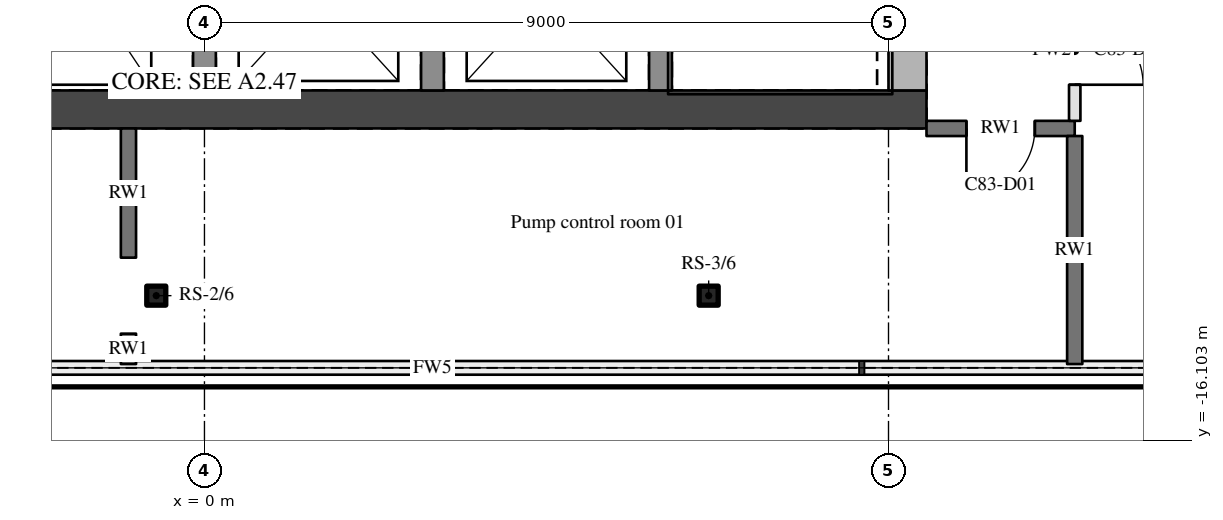
"""IFC4 building model, lengths in metres.
Left out: names, types, materials, properties, quantities, classifications, styles, units other than length and angle.
Written with IfcOpenShell. Run it as: python <this file> out.ifc"""

import sys

from ifc_helpers import new_model, si_unit, direction, frame, frame_2d, origin, origin_2d, place, context, subcontext, project, spatial, polyline, rectangle, hollow_rectangle, outline, extrude, element, fill, save


model = new_model("IFC4")
c1 = context("Model", 3, precision=1e-05, world=origin(), true_north=direction((0.0, 1.0)))
c2 = subcontext(c1, "Body", "Model", "MODEL_VIEW")
j1 = project(units=[si_unit("LENGTHUNIT", "METRE"), si_unit("PLANEANGLEUNIT", "RADIAN")], contexts=[c1])
p1 = place(None, origin())
s1 = spatial("IfcSite", under=j1, at=p1, CompositionType="ELEMENT")
p2 = place(p1, origin())
s2 = spatial("IfcBuilding", under=s1, at=p2, CompositionType="ELEMENT")
p3 = place(p2, frame((0.0, 0.0, 308.1)))
s3 = spatial("IfcBuildingStorey", under=s2, at=p3, CompositionType="ELEMENT", Elevation=308.1)
for number, where, z_axis, x_axis in (
    (1, (-0.634, -14.2, 0.0), (0.0, 0.0, 1.0), (1.0, 0.0, 0.0)),
    (2, (6.634, -14.2, 0.0), (0.0, 0.0, 1.0), (1.0, 0.0, 0.0)),
):
    element("IfcColumn", number, at=place(p3, frame(where, z_axis=z_axis, x_axis=x_axis)), inside=s3, PredefinedType="COLUMN", context=c2, shape_type="SweptSolid", body=[
        extrude(hollow_rectangle(XDim=0.25, YDim=0.25, WallThickness=0.02, InnerFilletRadius=0.03, OuterFilletRadius=0.05, at=origin_2d()), origin(), (0.0, 0.0, 1.0), 3.6),
    ])
p4 = place(p3, frame((-9.5, -11.75, 0.0), z_axis=(0.0, 0.0, 1.0), x_axis=(1.0, 0.0, 0.0)))
e3 = element("IfcWall", 3, at=p4, inside=s3, PredefinedType="SHEAR", context=c2, shape_type="SweptSolid", body=[
    extrude(outline(polyline([(0.0, 0.0), (19.0, 0.0), (19.0, 3.6), (0.0, 3.6), (0.0, 0.0)])), frame((0.0, 0.25, 0.0), z_axis=(0.0, -1.0, 0.0), x_axis=(1.0, 0.0, 0.0)), (0.0, 0.0, 1.0), 0.5),
])
p5 = place(p3, frame((9.25, -11.5, 0.0), z_axis=(0.0, 0.0, 1.0), x_axis=(0.0, 1.0, 0.0)))
e4 = element("IfcWall", 4, at=p5, inside=s3, PredefinedType="SHEAR", context=c2, shape_type="SweptSolid", body=[
    extrude(outline(polyline([(0.0, 0.0), (11.65, 0.0), (11.65, 3.6), (0.0, 3.6), (0.0, 0.0)])), frame((0.0, 0.25, 0.0), z_axis=(0.0, -1.0, 0.0), x_axis=(1.0, 0.0, 0.0)), (0.0, 0.0, 1.0), 0.5),
])
p6 = place(p5, frame((9.4, 0.0, 0.0)))
e5 = element("IfcOpeningElement", 5, at=p6, cuts=e4, PredefinedType="OPENING", context=c2, shape_type="SweptSolid", body=[
    extrude(rectangle(XDim=1.8, YDim=2.1, at=frame_2d((0.9, 1.05))), frame((0.0, 0.26, 0.0), z_axis=(0.0, -1.0, 0.0), x_axis=(1.0, 0.0, 0.0)), (0.0, 0.0, 1.0), 0.52),
])
p7 = place(p5, frame((5.25, 0.0, 0.0)))
e6 = element("IfcOpeningElement", 6, at=p7, cuts=e4, PredefinedType="OPENING", context=c2, shape_type="SweptSolid", body=[
    extrude(rectangle(XDim=1.1, YDim=2.1, at=frame_2d((0.55, 1.05))), frame((0.0, 0.26, 0.0), z_axis=(0.0, -1.0, 0.0), x_axis=(1.0, 0.0, 0.0)), (0.0, 0.0, 1.0), 0.52),
])
p8 = place(p3, frame((11.45, -12.0, 0.0), z_axis=(0.0, 0.0, 1.0), x_axis=(-1.0, 0.0, 0.0)))
e7 = element("IfcWall", 7, at=p8, inside=s3, PredefinedType="SOLIDWALL", context=c2, shape_type="SweptSolid", body=[
    extrude(rectangle(XDim=1.95, YDim=0.2, at=frame_2d((0.975, 0.0))), origin(), (0.0, 0.0, 1.0), 2.66),
])
p9 = place(p8, frame((0.525, 0.0, 0.0)))
e8 = element("IfcOpeningElement", 8, at=p9, cuts=e7, PredefinedType="OPENING", context=c2, shape_type="SweptSolid", body=[
    extrude(rectangle(XDim=0.9, YDim=2.1, at=frame_2d((0.45, 1.05))), frame((0.0, 0.11, 0.0), z_axis=(0.0, -1.0, 0.0), x_axis=(1.0, 0.0, 0.0)), (0.0, 0.0, 1.0), 0.22),
])
p10 = place(p3, frame((-1.0, -15.1, 0.0), z_axis=(0.0, 0.0, 1.0), x_axis=(0.0, 1.0, 0.0)))
e9 = element("IfcWall", 9, at=p10, inside=s3, PredefinedType="SOLIDWALL", context=c2, shape_type="SweptSolid", body=[
    extrude(rectangle(XDim=0.4, YDim=0.2, at=frame_2d((0.2, 0.0))), origin(), (0.0, 0.0, 1.0), 2.66),
])
p11 = place(p3, frame((-1.0, -13.7, 0.0), z_axis=(0.0, 0.0, 1.0), x_axis=(0.0, 1.0, 0.0)))
e10 = element("IfcWall", 10, at=p11, inside=s3, PredefinedType="SOLIDWALL", context=c2, shape_type="SweptSolid", body=[
    extrude(rectangle(XDim=1.7, YDim=0.2, at=frame_2d((0.85, 0.0))), origin(), (0.0, 0.0, 1.0), 2.66),
])
for number, where, z_axis, x_axis in (
    (11, (0.0, -11.5, 0.0), (0.0, 0.0, 1.0), (0.0, 1.0, 0.0)),
    (12, (3.0, -11.5, 0.0), (0.0, 0.0, 1.0), (0.0, 1.0, 0.0)),
):
    element("IfcWall", number, at=place(p3, frame(where, z_axis=z_axis, x_axis=x_axis)), inside=s3, PredefinedType="SHEAR", context=c2, shape_type="SweptSolid", body=[
        extrude(rectangle(XDim=2.4, YDim=0.3, at=frame_2d((1.2, 0.0))), origin(), (0.0, 0.0, 1.0), 3.6),
    ])
p12 = place(p3, frame((6.0, -5.1, 0.0), z_axis=(0.0, 0.0, 1.0), x_axis=(0.0, -1.0, 0.0)))
e13 = element("IfcWall", 13, at=p12, inside=s3, PredefinedType="SHEAR", context=c2, shape_type="SweptSolid", body=[
    extrude(rectangle(XDim=6.4, YDim=0.3, at=frame_2d((3.2, 0.0))), origin(), (0.0, 0.0, 1.0), 3.6),
])
p13 = place(p12, frame((0.15, 0.0, 0.0)))
e14 = element("IfcOpeningElement", 14, at=p13, cuts=e13, PredefinedType="OPENING", context=c2, shape_type="SweptSolid", body=[
    extrude(rectangle(XDim=1.1, YDim=2.1, at=frame_2d((0.55, 1.05))), frame((0.0, 0.16, 0.0), z_axis=(0.0, -1.0, 0.0), x_axis=(1.0, 0.0, 0.0)), (0.0, 0.0, 1.0), 0.32),
])
p14 = place(p3, frame((11.45, -15.1, 0.0), z_axis=(0.0, 0.0, 1.0), x_axis=(0.0, 1.0, 0.0)))
e15 = element("IfcWall", 15, at=p14, inside=s3, PredefinedType="SOLIDWALL", context=c2, shape_type="SweptSolid", body=[
    extrude(rectangle(XDim=3.0, YDim=0.2, at=frame_2d((1.5, 0.0))), origin(), (0.0, 0.0, 1.0), 2.66),
])
p15 = place(p3, frame((11.45, -10.05, 0.0), z_axis=(0.0, 0.0, 1.0), x_axis=(0.0, -1.0, 0.0)))
e16 = element("IfcWall", 16, at=p15, inside=s3, PredefinedType="PARTITIONING", context=c2, shape_type="SweptSolid", body=[
    extrude(rectangle(XDim=1.85, YDim=0.15, at=frame_2d((0.925, 0.0))), origin(), (0.0, 0.0, 1.0), 2.66),
])
p16 = place(p15, frame((0.475, 0.0, 0.0)))
e17 = element("IfcOpeningElement", 17, at=p16, cuts=e16, PredefinedType="OPENING", context=c2, shape_type="SweptSolid", body=[
    extrude(rectangle(XDim=0.9, YDim=2.1, at=frame_2d((0.45, 1.05))), frame((0.0, 0.085, 0.0), z_axis=(0.0, -1.0, 0.0), x_axis=(1.0, 0.0, 0.0)), (0.0, 0.0, 1.0), 0.17),
])
p17 = place(p16, origin())
e18 = element("IfcDoor", 18, at=p17, inside=s3, OperationType="SINGLE_SWING_RIGHT", PredefinedType="DOOR", context=c2, shape_type="SweptSolid", body=[
    extrude(rectangle(XDim=0.9, YDim=2.1, at=frame_2d((0.45, 1.05))), frame((0.0, 0.025, 0.0), z_axis=(0.0, -1.0, 0.0), x_axis=(1.0, 0.0, 0.0)), (0.0, 0.0, 1.0), 0.05),
])
fill(e17, e18)
p18 = place(p9, origin())
e19 = element("IfcDoor", 19, at=p18, inside=s3, OperationType="SINGLE_SWING_RIGHT", PredefinedType="DOOR", context=c2, shape_type="SweptSolid", body=[
    extrude(rectangle(XDim=0.9, YDim=2.1, at=frame_2d((0.45, 1.05))), frame((0.0, 0.025, 0.0), z_axis=(0.0, -1.0, 0.0), x_axis=(1.0, 0.0, 0.0)), (0.0, 0.0, 1.0), 0.05),
])
fill(e8, e19)
save(model, sys.argv[1])
